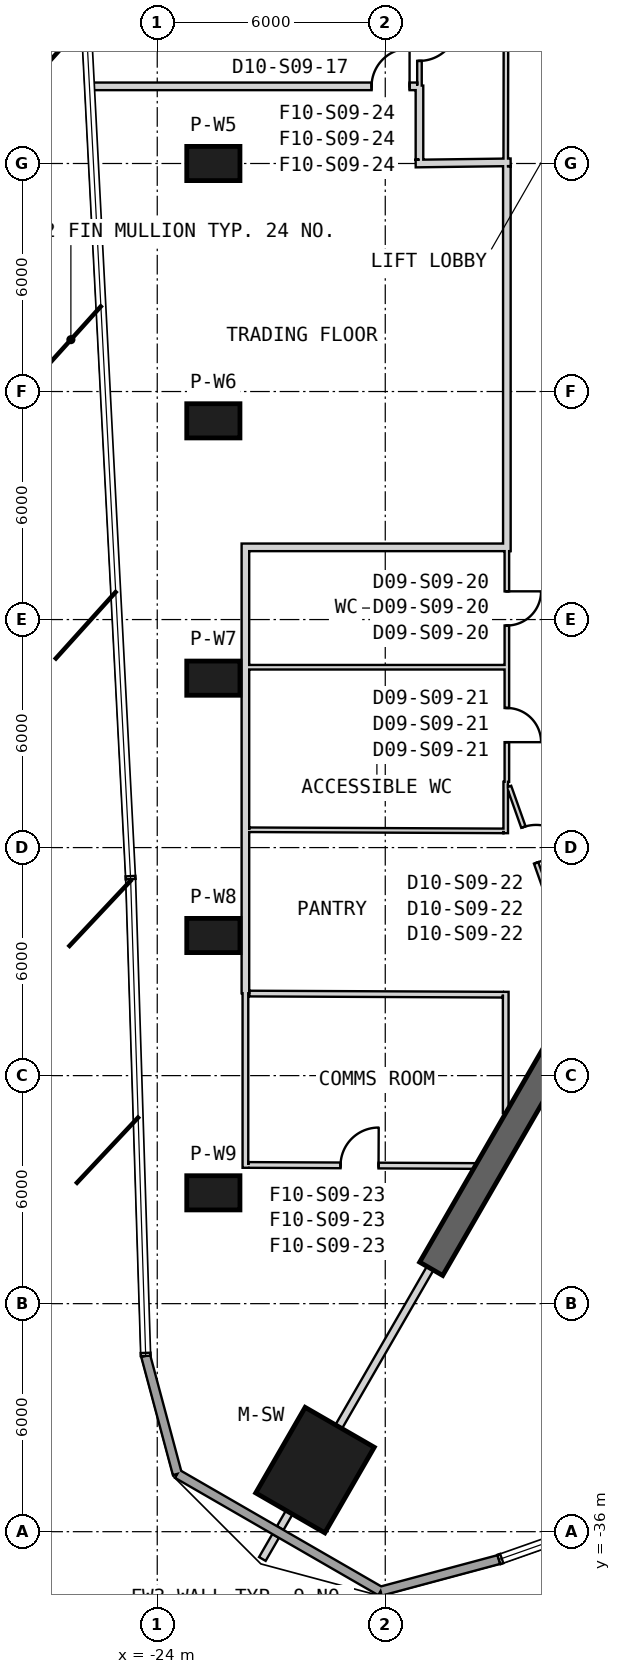
"""IFC4 building model, lengths in metres.
Left out: names, types, materials, properties, quantities, classifications, styles, units other than length and angle.
Written with IfcOpenShell. Run it as: python <this file> out.ifc"""

import sys

from ifc_helpers import new_model, si_unit, direction, frame, frame_2d, origin, origin_2d, place, context, subcontext, project, spatial, rectangle, extrude, element, fill, save


model = new_model("IFC4")
c1 = context("Model", 3, precision=1e-05, world=origin(), true_north=direction((0.0, 1.0)))
c2 = subcontext(c1, "Body", "Model", "MODEL_VIEW")
j1 = project(units=[si_unit("LENGTHUNIT", "METRE"), si_unit("PLANEANGLEUNIT", "RADIAN")], contexts=[c1])
p1 = place(None, origin())
s1 = spatial("IfcSite", under=j1, at=p1, CompositionType="ELEMENT")
p2 = place(p1, origin())
s2 = spatial("IfcBuilding", under=s1, at=p2, CompositionType="ELEMENT")
p3 = place(p2, frame((0.0, 0.0, 169.2)))
s3 = spatial("IfcBuildingStorey", under=s2, at=p3, CompositionType="ELEMENT", Elevation=169.2)
p4 = place(p3, frame((-19.849, -34.379, 0.0), z_axis=(0.0, 0.0, 1.0), x_axis=(-0.5, -0.866025403784, 0.0)))
e1 = element("IfcColumn", 1, at=p4, inside=s3, PredefinedType="COLUMN", context=c2, shape_type="SweptSolid", body=[
    extrude(rectangle(XDim=2.6, YDim=2.1, at=origin_2d()), origin(), (0.0, 0.0, 1.0), 4.0),
])
for number, where, z_axis, x_axis in (
    (2, (-22.524, 0.0, -0.3), (0.0, 0.0, 1.0), (-1.0, 0.0, 0.0)),
    (3, (-22.524, -6.771, -0.3), (0.0, 0.0, 1.0), (-1.0, 0.0, 0.0)),
    (4, (-22.524, -13.542, -0.3), (0.0, 0.0, 1.0), (-1.0, 0.0, 0.0)),
    (5, (-22.524, -20.313, -0.3), (0.0, 0.0, 1.0), (-1.0, 0.0, 0.0)),
    (6, (-22.524, -27.084, -0.3), (0.0, 0.0, 1.0), (-1.0, 0.0, 0.0)),
):
    element("IfcColumn", number, at=place(p3, frame(where, z_axis=z_axis, x_axis=x_axis)), inside=s3, PredefinedType="COLUMN", context=c2, shape_type="SweptSolid", body=[
        extrude(rectangle(XDim=1.4, YDim=0.9, at=origin_2d()), origin(), (0.0, 0.0, 1.0), 4.3),
    ])
p5 = place(p3, frame((-10.575, -18.316, 0.0), z_axis=(0.0, 0.0, 1.0), x_axis=(-0.499995558535, -0.86602796805, 0.0)))
e7 = element("IfcWall", 7, at=p5, inside=s3, PredefinedType="SHEAR", context=c2, shape_type="SweptSolid", body=[
    extrude(rectangle(XDim=12.433, YDim=0.7, at=frame_2d((6.216, 0.0))), origin(), (0.0, 0.0, 1.0), 4.0),
])
p6 = place(p3, frame((-24.304, -31.375, 0.0), z_axis=(0.0, 0.0, 1.0), x_axis=(0.258763925409, -0.965940593881, 0.0)))
e8 = element("IfcWall", 8, at=p6, inside=s3, PredefinedType="SOLIDWALL", context=c2, shape_type="SweptSolid", body=[
    extrude(rectangle(XDim=3.214, YDim=0.24, at=frame_2d((1.607, 0.0))), origin(), (0.0, 0.0, 1.0), 3.7),
])
p7 = place(p3, frame((-23.472, -34.48, 0.0), z_axis=(0.0, 0.0, 1.0), x_axis=(0.866030202489, -0.499991688307, 0.0)))
e9 = element("IfcWall", 9, at=p7, inside=s3, PredefinedType="SOLIDWALL", context=c2, shape_type="SweptSolid", body=[
    extrude(rectangle(XDim=6.175, YDim=0.24, at=frame_2d((3.087, 0.0))), origin(), (0.0, 0.0, 1.0), 3.7),
])
p8 = place(p3, frame((-18.125, -37.567, 0.0), z_axis=(0.0, 0.0, 1.0), x_axis=(0.965919993975, 0.258840810616, 0.0)))
e10 = element("IfcWall", 10, at=p8, inside=s3, PredefinedType="SOLIDWALL", context=c2, shape_type="SweptSolid", body=[
    extrude(rectangle(XDim=3.224, YDim=0.24, at=frame_2d((1.612, 0.0))), origin(), (0.0, 0.0, 1.0), 3.7),
])
p9 = place(p3, frame((-14.8, 16.257, 0.0), z_axis=(0.0, 0.0, 1.0), x_axis=(-0.001847148781, -0.999998294019, 0.0)))
e11 = element("IfcWall", 11, at=p9, inside=s3, PredefinedType="PARTITIONING", context=c2, shape_type="SweptSolid", body=[
    extrude(rectangle(XDim=16.257, YDim=0.12, at=frame_2d((8.128, 0.0))), origin(), (0.0, 0.0, 1.0), 2.88),
])
p10 = place(p9, frame((7.629, 0.0, 0.0)))
e12 = element("IfcOpeningElement", 12, at=p10, cuts=e11, PredefinedType="OPENING", context=c2, shape_type="SweptSolid", body=[
    extrude(rectangle(XDim=1.0, YDim=2.1, at=frame_2d((0.5, 1.05))), frame((0.0, 0.07, 0.0), z_axis=(0.0, -1.0, 0.0), x_axis=(1.0, 0.0, 0.0)), (0.0, 0.0, 1.0), 0.14),
])
p11 = place(p3, frame((-14.8, -10.13, 0.0), z_axis=(0.0, 0.0, 1.0), x_axis=(0.0, -1.0, 0.0)))
e13 = element("IfcWall", 13, at=p11, inside=s3, PredefinedType="PARTITIONING", context=c2, shape_type="SweptSolid", body=[
    extrude(rectangle(XDim=6.138, YDim=0.12, at=frame_2d((3.069, 0.0))), origin(), (0.0, 0.0, 1.0), 2.88),
])
p12 = place(p11, frame((1.127, 0.0, 0.0)))
e14 = element("IfcOpeningElement", 14, at=p12, cuts=e13, PredefinedType="OPENING", context=c2, shape_type="SweptSolid", body=[
    extrude(rectangle(XDim=0.9, YDim=2.1, at=frame_2d((0.45, 1.05))), frame((0.0, 0.07, 0.0), z_axis=(0.0, -1.0, 0.0), x_axis=(1.0, 0.0, 0.0)), (0.0, 0.0, 1.0), 0.14),
])
p13 = place(p11, frame((4.196, 0.0, 0.0)))
e15 = element("IfcOpeningElement", 15, at=p13, cuts=e13, PredefinedType="OPENING", context=c2, shape_type="SweptSolid", body=[
    extrude(rectangle(XDim=0.9, YDim=2.1, at=frame_2d((0.45, 1.05))), frame((0.0, 0.07, 0.0), z_axis=(0.0, -1.0, 0.0), x_axis=(1.0, 0.0, 0.0)), (0.0, 0.0, 1.0), 0.14),
])
p14 = place(p3, frame((-17.1, 4.35, 0.0), z_axis=(0.0, 0.0, 1.0), x_axis=(0.0, -1.0, 0.0)))
e16 = element("IfcWall", 16, at=p14, inside=s3, PredefinedType="PARTITIONING", context=c2, shape_type="SweptSolid", body=[
    extrude(rectangle(XDim=2.3, YDim=0.12, at=frame_2d((1.15, 0.0))), origin(), (0.0, 0.0, 1.0), 3.7),
])
p15 = place(p14, frame((0.65, 0.0, 0.0)))
e17 = element("IfcOpeningElement", 17, at=p15, cuts=e16, PredefinedType="OPENING", context=c2, shape_type="SweptSolid", body=[
    extrude(rectangle(XDim=1.0, YDim=2.1, at=frame_2d((0.5, 1.05))), frame((0.0, 0.07, 0.0), z_axis=(0.0, -1.0, 0.0), x_axis=(1.0, 0.0, 0.0)), (0.0, 0.0, 1.0), 0.14),
])
p16 = place(p3, frame((-17.2, -0.001, 0.0), z_axis=(0.0, 0.0, 1.0), x_axis=(0.999915662945, 0.012987185857, 0.0)))
e18 = element("IfcWall", 18, at=p16, inside=s3, PredefinedType="PARTITIONING", context=c2, shape_type="SweptSolid", body=[
    extrude(rectangle(XDim=2.5, YDim=0.2, at=frame_2d((1.25, 0.0))), origin(), (0.0, 0.0, 1.0), 3.07),
])
p17 = place(p3, frame((-17.1, 2.05, 0.0), z_axis=(0.0, 0.0, 1.0), x_axis=(0.0, -1.0, 0.0)))
e19 = element("IfcWall", 19, at=p17, inside=s3, PredefinedType="PARTITIONING", context=c2, shape_type="SweptSolid", body=[
    extrude(rectangle(XDim=1.95, YDim=0.2, at=frame_2d((0.975, 0.0))), origin(), (0.0, 0.0, 1.0), 3.07),
])
p18 = place(p3, frame((-14.8, -0.07, 0.0), z_axis=(0.0, 0.0, 1.0), x_axis=(0.0, -1.0, 0.0)))
e20 = element("IfcWall", 20, at=p18, inside=s3, PredefinedType="PARTITIONING", context=c2, shape_type="SweptSolid", body=[
    extrude(rectangle(XDim=10.13, YDim=0.2, at=frame_2d((5.065, 0.0))), origin(), (0.0, 0.0, 1.0), 2.98),
])
p19 = place(p3, frame((-14.743, -16.394, 0.0), z_axis=(0.0, 0.0, 1.0), x_axis=(0.334279115597, -0.942474123186, 0.0)))
e21 = element("IfcWall", 21, at=p19, inside=s3, PredefinedType="PARTITIONING", context=c2, shape_type="SweptSolid", body=[
    extrude(rectangle(XDim=3.264, YDim=0.12, at=frame_2d((1.632, 0.0))), origin(), (0.0, 0.0, 1.0), 2.78),
])
p20 = place(p19, frame((1.132, 0.0, 0.0)))
e22 = element("IfcOpeningElement", 22, at=p20, cuts=e21, PredefinedType="OPENING", context=c2, shape_type="SweptSolid", body=[
    extrude(rectangle(XDim=1.0, YDim=2.1, at=frame_2d((0.5, 1.05))), frame((0.0, 0.07, 0.0), z_axis=(0.0, -1.0, 0.0), x_axis=(1.0, 0.0, 0.0)), (0.0, 0.0, 1.0), 0.14),
])
p21 = place(p3, frame((-25.784, 2.03, 0.0), z_axis=(0.0, 0.0, 1.0), x_axis=(1.0, 0.0, 0.0)))
e23 = element("IfcWall", 23, at=p21, inside=s3, PredefinedType="PARTITIONING", context=c2, shape_type="SweptSolid", body=[
    extrude(rectangle(XDim=8.624, YDim=0.2, at=frame_2d((4.312, 0.0))), origin(), (0.0, 0.0, 1.0), 3.7),
])
p22 = place(p21, frame((7.424, 0.0, 0.0)))
e24 = element("IfcOpeningElement", 24, at=p22, cuts=e23, PredefinedType="OPENING", context=c2, shape_type="SweptSolid", body=[
    extrude(rectangle(XDim=1.0, YDim=2.1, at=frame_2d((0.5, 1.05))), frame((0.0, 0.11, 0.0), z_axis=(0.0, -1.0, 0.0), x_axis=(1.0, 0.0, 0.0)), (0.0, 0.0, 1.0), 0.22),
])
p23 = place(p3, frame((-16.817, -29.068, 0.0), z_axis=(0.0, 0.0, 1.0), x_axis=(-0.499988695522, -0.866031930329, 0.0)))
e25 = element("IfcWall", 25, at=p23, inside=s3, PredefinedType="PARTITIONING", context=c2, shape_type="SweptSolid", body=[
    extrude(rectangle(XDim=4.815, YDim=0.2, at=frame_2d((2.408, 0.0))), origin(), (0.0, 0.0, 1.0), 3.27),
])
p24 = place(p3, frame((-20.525, -35.49, 0.0), z_axis=(0.0, 0.0, 1.0), x_axis=(-0.499869636591, -0.866100656052, 0.0)))
e26 = element("IfcWall", 26, at=p24, inside=s3, PredefinedType="PARTITIONING", context=c2, shape_type="SweptSolid", body=[
    extrude(rectangle(XDim=0.479, YDim=0.2, at=frame_2d((0.239, 0.0))), origin(), (0.0, 0.0, 1.0), 3.7),
])
p25 = place(p3, frame((-20.884, -36.113, 0.0), z_axis=(0.0, 0.0, 1.0), x_axis=(-0.49989369433, -0.866086770693, 0.0)))
e27 = element("IfcWall", 27, at=p25, inside=s3, PredefinedType="PARTITIONING", context=c2, shape_type="SweptSolid", body=[
    extrude(rectangle(XDim=0.699, YDim=0.2, at=frame_2d((0.35, 0.0))), origin(), (0.0, 0.0, 1.0), 3.7),
])
p26 = place(p3, frame((-14.9, -10.1, 0.0), z_axis=(0.0, 0.0, 1.0), x_axis=(-1.0, 0.0, 0.0)))
e28 = element("IfcWall", 28, at=p26, inside=s3, PredefinedType="PARTITIONING", context=c2, shape_type="SweptSolid", body=[
    extrude(rectangle(XDim=6.88, YDim=0.2, at=frame_2d((3.44, 0.0))), origin(), (0.0, 0.0, 1.0), 2.98),
])
p27 = place(p3, frame((-21.68, -21.833, 0.0), z_axis=(0.0, 0.0, 1.0), x_axis=(0.0, 1.0, 0.0)))
e29 = element("IfcWall", 29, at=p27, inside=s3, PredefinedType="PARTITIONING", context=c2, shape_type="SweptSolid", body=[
    extrude(rectangle(XDim=4.302, YDim=0.2, at=frame_2d((2.151, 0.0))), origin(), (0.0, 0.0, 1.0), 2.88),
])
p28 = place(p3, frame((-21.68, -17.531, 0.0), z_axis=(0.0, 0.0, 1.0), x_axis=(0.0, 1.0, 0.0)))
e30 = element("IfcWall", 30, at=p28, inside=s3, PredefinedType="PARTITIONING", context=c2, shape_type="SweptSolid", body=[
    extrude(rectangle(XDim=7.331, YDim=0.2, at=frame_2d((3.665, 0.0))), origin(), (0.0, 0.0, 1.0), 2.98),
])
p29 = place(p3, frame((-21.68, -26.425, 0.0), z_axis=(0.0, 0.0, 1.0), x_axis=(0.0, 1.0, 0.0)))
e31 = element("IfcWall", 31, at=p29, inside=s3, PredefinedType="PLUMBINGWALL", context=c2, shape_type="SweptSolid", body=[
    extrude(rectangle(XDim=4.592, YDim=0.15, at=frame_2d((2.296, 0.0))), origin(), (0.0, 0.0, 1.0), 2.78),
])
p30 = place(p3, frame((-21.605, -26.35, 0.0), z_axis=(0.0, 0.0, 1.0), x_axis=(0.999989138364, -0.004660810408, 0.0)))
e32 = element("IfcWall", 32, at=p30, inside=s3, PredefinedType="PLUMBINGWALL", context=c2, shape_type="SweptSolid", body=[
    extrude(rectangle(XDim=5.971, YDim=0.15, at=frame_2d((2.986, 0.0))), origin(), (0.0, 0.0, 1.0), 3.7),
])
p31 = place(p30, frame((2.428, 0.0, 0.0)))
e33 = element("IfcOpeningElement", 33, at=p31, cuts=e32, PredefinedType="OPENING", context=c2, shape_type="SweptSolid", body=[
    extrude(rectangle(XDim=1.0, YDim=2.1, at=frame_2d((0.5, 1.05))), frame((0.0, 0.085, 0.0), z_axis=(0.0, -1.0, 0.0), x_axis=(1.0, 0.0, 0.0)), (0.0, 0.0, 1.0), 0.17),
])
p32 = place(p3, frame((-14.83, -13.254, 0.0), z_axis=(0.0, 0.0, 1.0), x_axis=(-1.0, 0.0, 0.0)))
e34 = element("IfcWall", 34, at=p32, inside=s3, PredefinedType="PARTITIONING", context=c2, shape_type="SweptSolid", body=[
    extrude(rectangle(XDim=6.75, YDim=0.12, at=frame_2d((3.375, 0.0))), origin(), (0.0, 0.0, 1.0), 2.88),
])
p33 = place(p3, frame((-14.83, -17.621, 0.0), z_axis=(0.0, 0.0, 1.0), x_axis=(0.0, 1.0, 0.0)))
e35 = element("IfcWall", 35, at=p33, inside=s3, PredefinedType="PARTITIONING", context=c2, shape_type="SweptSolid", body=[
    extrude(rectangle(XDim=1.352, YDim=0.12, at=frame_2d((0.676, 0.0))), origin(), (0.0, 0.0, 1.0), 2.78),
])
p34 = place(p3, frame((-14.89, -17.56, 0.0), z_axis=(0.0, 0.0, 1.0), x_axis=(-0.999990411956, 0.004379040595, 0.0)))
e36 = element("IfcWall", 36, at=p34, inside=s3, PredefinedType="PARTITIONING", context=c2, shape_type="SweptSolid", body=[
    extrude(rectangle(XDim=6.69, YDim=0.12, at=frame_2d((3.345, 0.0))), origin(), (0.0, 0.0, 1.0), 2.88),
])
p35 = place(p3, frame((-14.83, -24.986, 0.0), z_axis=(0.0, 0.0, 1.0), x_axis=(0.0, 1.0, 0.0)))
e37 = element("IfcWall", 37, at=p35, inside=s3, PredefinedType="PLUMBINGWALL", context=c2, shape_type="SweptSolid", body=[
    extrude(rectangle(XDim=3.191, YDim=0.15, at=frame_2d((1.595, 0.0))), origin(), (0.0, 0.0, 1.0), 3.7),
])
p36 = place(p3, frame((-21.58, -21.841, 0.0), z_axis=(0.0, 0.0, 1.0), x_axis=(0.999990368422, -0.004388970565, 0.0)))
e38 = element("IfcWall", 38, at=p36, inside=s3, PredefinedType="PLUMBINGWALL", context=c2, shape_type="SweptSolid", body=[
    extrude(rectangle(XDim=6.675, YDim=0.15, at=frame_2d((3.337, 0.0))), origin(), (0.0, 0.0, 1.0), 2.78),
])
p37 = place(p15, origin())
e39 = element("IfcDoor", 39, at=p37, inside=s3, OperationType="SINGLE_SWING_RIGHT", PredefinedType="NOTDEFINED", context=c2, shape_type="SweptSolid", body=[
    extrude(rectangle(XDim=1.0, YDim=2.1, at=frame_2d((0.5, 1.05))), frame((0.0, 0.025, 0.0), z_axis=(0.0, -1.0, 0.0), x_axis=(1.0, 0.0, 0.0)), (0.0, 0.0, 1.0), 0.05),
])
fill(e17, e39)
p38 = place(p12, origin())
e40 = element("IfcDoor", 40, at=p38, inside=s3, OperationType="SINGLE_SWING_LEFT", PredefinedType="NOTDEFINED", context=c2, shape_type="SweptSolid", body=[
    extrude(rectangle(XDim=0.9, YDim=2.1, at=frame_2d((0.45, 1.05))), frame((0.0, 0.025, 0.0), z_axis=(0.0, -1.0, 0.0), x_axis=(1.0, 0.0, 0.0)), (0.0, 0.0, 1.0), 0.05),
])
fill(e14, e40)
p39 = place(p13, origin())
e41 = element("IfcDoor", 41, at=p39, inside=s3, OperationType="SINGLE_SWING_RIGHT", PredefinedType="NOTDEFINED", context=c2, shape_type="SweptSolid", body=[
    extrude(rectangle(XDim=0.9, YDim=2.1, at=frame_2d((0.45, 1.05))), frame((0.0, 0.025, 0.0), z_axis=(0.0, -1.0, 0.0), x_axis=(1.0, 0.0, 0.0)), (0.0, 0.0, 1.0), 0.05),
])
fill(e15, e41)
p40 = place(p20, origin())
e42 = element("IfcDoor", 42, at=p40, inside=s3, OperationType="SINGLE_SWING_RIGHT", PredefinedType="NOTDEFINED", context=c2, shape_type="SweptSolid", body=[
    extrude(rectangle(XDim=1.0, YDim=2.1, at=frame_2d((0.5, 1.05))), frame((0.0, 0.025, 0.0), z_axis=(0.0, -1.0, 0.0), x_axis=(1.0, 0.0, 0.0)), (0.0, 0.0, 1.0), 0.05),
])
fill(e22, e42)
p41 = place(p31, origin())
e43 = element("IfcDoor", 43, at=p41, inside=s3, OperationType="SINGLE_SWING_LEFT", PredefinedType="USERDEFINED", context=c2, shape_type="SweptSolid", body=[
    extrude(rectangle(XDim=1.0, YDim=2.1, at=frame_2d((0.5, 1.05))), frame((0.0, 0.025, 0.0), z_axis=(0.0, -1.0, 0.0), x_axis=(1.0, 0.0, 0.0)), (0.0, 0.0, 1.0), 0.05),
])
fill(e33, e43)
p42 = place(p22, origin())
e44 = element("IfcDoor", 44, at=p42, inside=s3, OperationType="SINGLE_SWING_RIGHT", PredefinedType="USERDEFINED", context=c2, shape_type="SweptSolid", body=[
    extrude(rectangle(XDim=1.0, YDim=2.1, at=frame_2d((0.5, 1.05))), frame((0.0, 0.025, 0.0), z_axis=(0.0, -1.0, 0.0), x_axis=(1.0, 0.0, 0.0)), (0.0, 0.0, 1.0), 0.05),
])
fill(e24, e44)
save(model, sys.argv[1])
